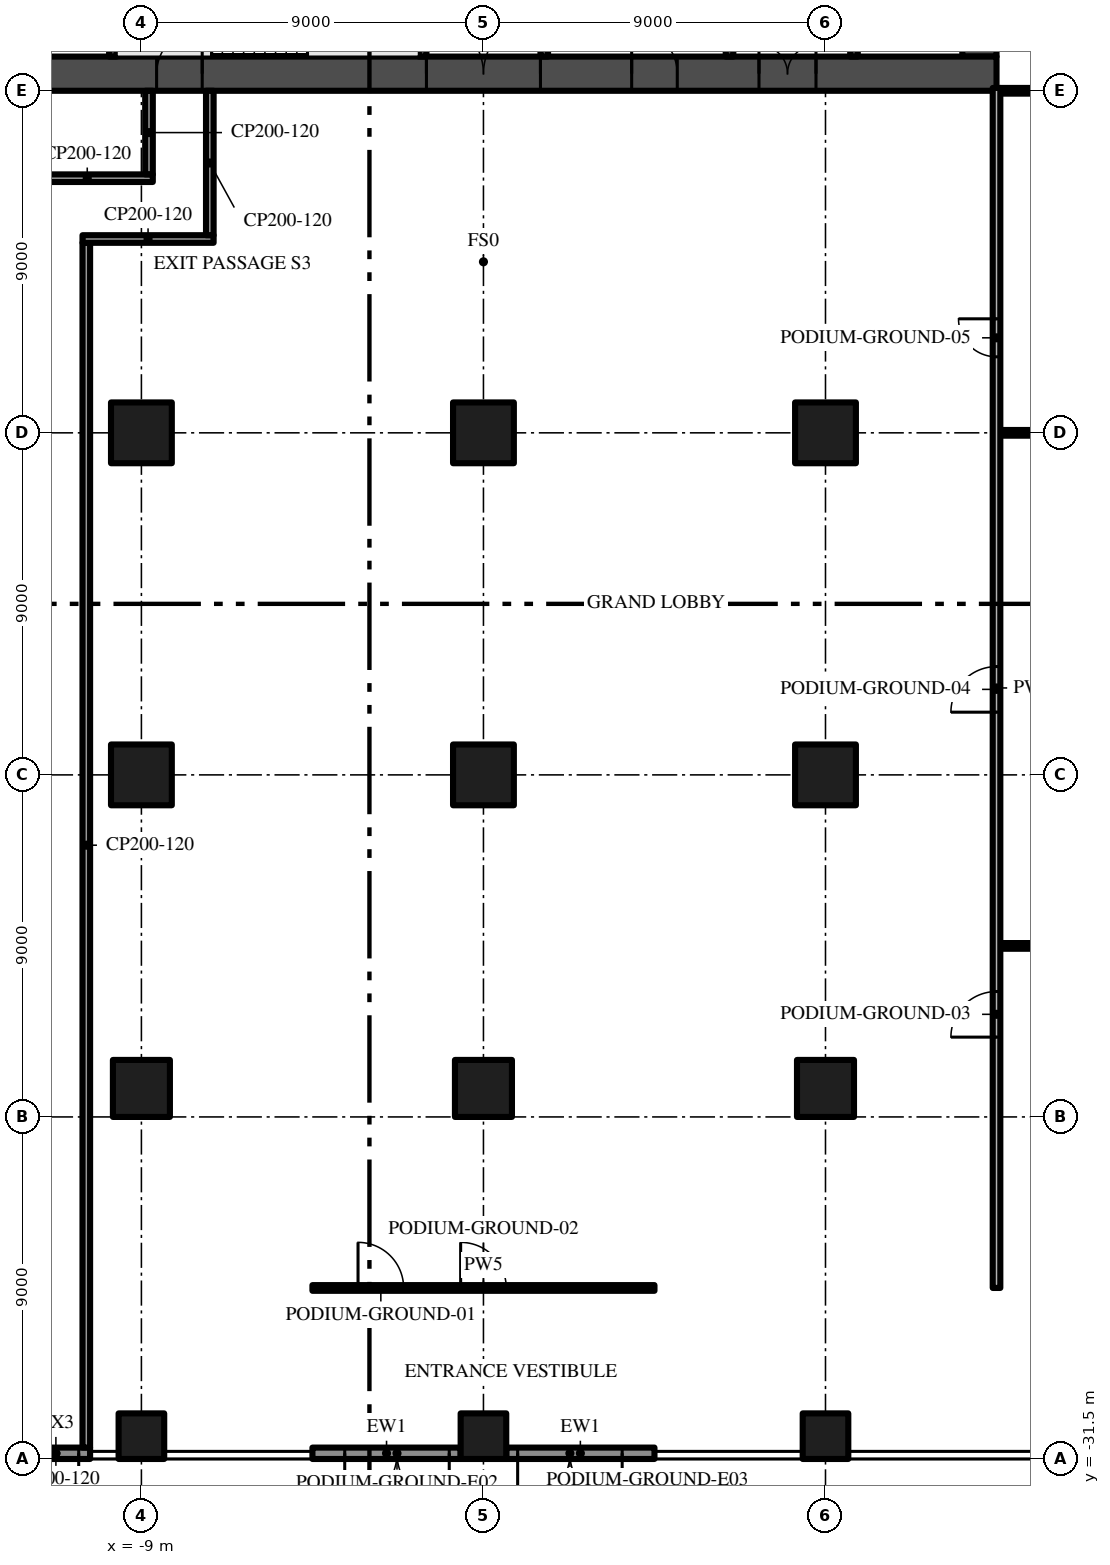
"""IFC4 building model, lengths in metres.
Left out: names, types, materials, properties, quantities, classifications, styles, units other than length and angle.
Written with IfcOpenShell. Run it as: python <this file> out.ifc"""

import sys

from ifc_helpers import new_model, si_unit, direction, frame, frame_2d, origin, origin_2d, place, context, subcontext, project, spatial, rectangle, extrude, element, fill, save


model = new_model("IFC4")
c1 = context("Model", 3, precision=1e-05, world=origin(), true_north=direction((0.0, 1.0)))
c2 = subcontext(c1, "Body", "Model", "MODEL_VIEW")
j1 = project(units=[si_unit("LENGTHUNIT", "METRE"), si_unit("PLANEANGLEUNIT", "RADIAN")], contexts=[c1])
p1 = place(None, origin())
s1 = spatial("IfcSite", under=j1, at=p1, CompositionType="ELEMENT")
p2 = place(p1, origin())
s2 = spatial("IfcBuilding", under=s1, at=p2, CompositionType="ELEMENT")
p3 = place(p2, origin())
s3 = spatial("IfcBuildingStorey", under=s2, at=p3, CompositionType="ELEMENT", Elevation=0.0)
p4 = place(p3, frame((-13.5, 4.95, -2.2), z_axis=(0.0, 0.0, 1.0), x_axis=(1.0, 0.0, 0.0)))
e1 = element("IfcWall", 1, at=p4, inside=s3, PredefinedType="SHEAR", context=c2, shape_type="SweptSolid", body=[
    extrude(rectangle(XDim=27.0, YDim=0.9, at=frame_2d((13.5, 0.0))), origin(), (0.0, 0.0, 1.0), 7.8),
])
p5 = place(p4, frame((12.0, 0.0, 2.2)))
e2 = element("IfcOpeningElement", 2, at=p5, cuts=e1, PredefinedType="OPENING", context=c2, shape_type="SweptSolid", body=[
    extrude(rectangle(XDim=3.0, YDim=2.4, at=frame_2d((1.5, 1.2))), frame((0.0, 0.46, 0.0), z_axis=(0.0, -1.0, 0.0), x_axis=(1.0, 0.0, 0.0)), (0.0, 0.0, 1.0), 0.92),
])
p6 = place(p4, frame((4.9, 0.0, 2.2)))
e3 = element("IfcOpeningElement", 3, at=p6, cuts=e1, PredefinedType="OPENING", context=c2, shape_type="SweptSolid", body=[
    extrude(rectangle(XDim=1.2, YDim=2.2, at=frame_2d((0.6, 1.1))), frame((0.0, 0.46, 0.0), z_axis=(0.0, -1.0, 0.0), x_axis=(1.0, 0.0, 0.0)), (0.0, 0.0, 1.0), 0.92),
])
p7 = place(p4, frame((20.75, 0.0, 2.2)))
e4 = element("IfcOpeningElement", 4, at=p7, cuts=e1, PredefinedType="OPENING", context=c2, shape_type="SweptSolid", body=[
    extrude(rectangle(XDim=1.5, YDim=2.2, at=frame_2d((0.75, 1.1))), frame((0.0, 0.46, 0.0), z_axis=(0.0, -1.0, 0.0), x_axis=(1.0, 0.0, 0.0)), (0.0, 0.0, 1.0), 0.92),
])
p8 = place(p4, frame((17.4, 0.0, 2.2)))
e5 = element("IfcOpeningElement", 5, at=p8, cuts=e1, PredefinedType="OPENING", context=c2, shape_type="SweptSolid", body=[
    extrude(rectangle(XDim=1.2, YDim=2.2, at=frame_2d((0.6, 1.1))), frame((0.0, 0.46, 0.0), z_axis=(0.0, -1.0, 0.0), x_axis=(1.0, 0.0, 0.0)), (0.0, 0.0, 1.0), 0.92),
])
p9 = place(p3, frame((13.05, 5.4, -2.2), z_axis=(0.0, 0.0, 1.0), x_axis=(0.0, 1.0, 0.0)))
e6 = element("IfcWall", 6, at=p9, inside=s3, PredefinedType="SHEAR", context=c2, shape_type="SweptSolid", body=[
    extrude(rectangle(XDim=16.2, YDim=0.9, at=frame_2d((8.1, 0.0))), origin(), (0.0, 0.0, 1.0), 7.8),
])
p10 = place(p9, frame((6.0, 0.0, 2.2)))
e7 = element("IfcOpeningElement", 7, at=p10, cuts=e6, PredefinedType="OPENING", context=c2, shape_type="SweptSolid", body=[
    extrude(rectangle(XDim=1.2, YDim=2.2, at=frame_2d((0.6, 1.1))), frame((0.0, 0.46, 0.0), z_axis=(0.0, -1.0, 0.0), x_axis=(1.0, 0.0, 0.0)), (0.0, 0.0, 1.0), 0.92),
])
for number, where, z_axis, x_axis in (
    (8, (-9.0, -30.9, 0.0), (0.0, 0.0, 1.0), (1.0, 0.0, 0.0)),
    (9, (0.0, -30.9, 0.0), (0.0, 0.0, 1.0), (1.0, 0.0, 0.0)),
    (10, (9.0, -30.9, 0.0), (0.0, 0.0, 1.0), (1.0, 0.0, 0.0)),
):
    element("IfcColumn", number, at=place(p3, frame(where, z_axis=z_axis, x_axis=x_axis)), inside=s3, PredefinedType="COLUMN", context=c2, shape_type="SweptSolid", body=[
        extrude(rectangle(XDim=1.2, YDim=1.2, at=origin_2d()), origin(), (0.0, 0.0, 1.0), 5.6),
    ])
p11 = place(p3, frame((-9.0, -13.5, 0.0), z_axis=(0.0, 0.0, 1.0), x_axis=(1.0, 0.0, 0.0)))
e11 = element("IfcColumn", 11, at=p11, inside=s3, PredefinedType="COLUMN", context=c2, shape_type="SweptSolid", body=[
    extrude(rectangle(XDim=1.6, YDim=1.6, at=origin_2d()), origin(), (0.0, 0.0, 1.0), 5.6),
])
p12 = place(p3, frame((-9.0, -21.75, 0.0), z_axis=(0.0, 0.0, 1.0), x_axis=(1.0, 0.0, 0.0)))
e12 = element("IfcColumn", 12, at=p12, inside=s3, PredefinedType="COLUMN", context=c2, shape_type="SweptSolid", body=[
    extrude(rectangle(XDim=1.5, YDim=1.5, at=origin_2d()), origin(), (0.0, 0.0, 1.0), 5.6),
])
for number, where, z_axis, x_axis in (
    (13, (-9.0, -4.5, 0.0), (0.0, 0.0, 1.0), (1.0, 0.0, 0.0)),
    (14, (0.0, -13.5, 0.0), (0.0, 0.0, 1.0), (1.0, 0.0, 0.0)),
):
    element("IfcColumn", number, at=place(p3, frame(where, z_axis=z_axis, x_axis=x_axis)), inside=s3, PredefinedType="COLUMN", context=c2, shape_type="SweptSolid", body=[
        extrude(rectangle(XDim=1.6, YDim=1.6, at=origin_2d()), origin(), (0.0, 0.0, 1.0), 5.6),
    ])
p13 = place(p3, frame((0.0, -21.75, 0.0), z_axis=(0.0, 0.0, 1.0), x_axis=(1.0, 0.0, 0.0)))
e15 = element("IfcColumn", 15, at=p13, inside=s3, PredefinedType="COLUMN", context=c2, shape_type="SweptSolid", body=[
    extrude(rectangle(XDim=1.5, YDim=1.5, at=origin_2d()), origin(), (0.0, 0.0, 1.0), 5.6),
])
for number, where, z_axis, x_axis in (
    (16, (0.0, -4.5, 0.0), (0.0, 0.0, 1.0), (1.0, 0.0, 0.0)),
    (17, (9.0, -13.5, 0.0), (0.0, 0.0, 1.0), (1.0, 0.0, 0.0)),
):
    element("IfcColumn", number, at=place(p3, frame(where, z_axis=z_axis, x_axis=x_axis)), inside=s3, PredefinedType="COLUMN", context=c2, shape_type="SweptSolid", body=[
        extrude(rectangle(XDim=1.6, YDim=1.6, at=origin_2d()), origin(), (0.0, 0.0, 1.0), 5.6),
    ])
p14 = place(p3, frame((9.0, -21.75, 0.0), z_axis=(0.0, 0.0, 1.0), x_axis=(1.0, 0.0, 0.0)))
e18 = element("IfcColumn", 18, at=p14, inside=s3, PredefinedType="COLUMN", context=c2, shape_type="SweptSolid", body=[
    extrude(rectangle(XDim=1.5, YDim=1.5, at=origin_2d()), origin(), (0.0, 0.0, 1.0), 5.6),
])
p15 = place(p3, frame((9.0, -4.5, 0.0), z_axis=(0.0, 0.0, 1.0), x_axis=(1.0, 0.0, 0.0)))
e19 = element("IfcColumn", 19, at=p15, inside=s3, PredefinedType="COLUMN", context=c2, shape_type="SweptSolid", body=[
    extrude(rectangle(XDim=1.6, YDim=1.6, at=origin_2d()), origin(), (0.0, 0.0, 1.0), 5.6),
])
p16 = place(p3, frame((-0.6, -31.35, 0.0), z_axis=(0.0, 0.0, 1.0), x_axis=(-1.0, 0.0, 0.0)))
e20 = element("IfcWall", 20, at=p16, inside=s3, PredefinedType="SOLIDWALL", context=c2, shape_type="SweptSolid", body=[
    extrude(rectangle(XDim=3.9, YDim=0.3, at=frame_2d((1.95, 0.0))), origin(), (0.0, 0.0, 1.0), 5.6),
])
p17 = place(p16, frame((0.3, 0.0, 0.0)))
e21 = element("IfcOpeningElement", 21, at=p17, cuts=e20, PredefinedType="OPENING", context=c2, shape_type="SweptSolid", body=[
    extrude(rectangle(XDim=2.75, YDim=2.7, at=frame_2d((1.375, 1.35))), frame((0.0, 0.16, 0.0), z_axis=(0.0, -1.0, 0.0), x_axis=(1.0, 0.0, 0.0)), (0.0, 0.0, 1.0), 0.32),
])
p18 = place(p3, frame((4.5, -31.35, 0.0), z_axis=(0.0, 0.0, 1.0), x_axis=(-1.0, 0.0, 0.0)))
e22 = element("IfcWall", 22, at=p18, inside=s3, PredefinedType="SOLIDWALL", context=c2, shape_type="SweptSolid", body=[
    extrude(rectangle(XDim=3.9, YDim=0.3, at=frame_2d((1.95, 0.0))), origin(), (0.0, 0.0, 1.0), 5.6),
])
p19 = place(p18, frame((0.85, 0.0, 0.0)))
e23 = element("IfcOpeningElement", 23, at=p19, cuts=e22, PredefinedType="OPENING", context=c2, shape_type="SweptSolid", body=[
    extrude(rectangle(XDim=2.75, YDim=2.7, at=frame_2d((1.375, 1.35))), frame((0.0, 0.16, 0.0), z_axis=(0.0, -1.0, 0.0), x_axis=(1.0, 0.0, 0.0)), (0.0, 0.0, 1.0), 0.32),
])
for number, where, z_axis, x_axis in (
    (24, (-9.75, 5.4, -0.4), (0.0, 0.0, 1.0), (0.0, 1.0, 0.0)),
    (25, (-1.6, 5.4, -0.4), (0.0, 0.0, 1.0), (0.0, 1.0, 0.0)),
):
    element("IfcWall", number, at=place(p3, frame(where, z_axis=z_axis, x_axis=x_axis)), inside=s3, PredefinedType="SHEAR", context=c2, shape_type="SweptSolid", body=[
        extrude(rectangle(XDim=2.55, YDim=0.2, at=frame_2d((1.275, 0.0))), origin(), (0.0, 0.0, 1.0), 6.0),
    ])
p20 = place(p3, frame((1.6, 9.2, -0.4), z_axis=(0.0, 0.0, 1.0), x_axis=(0.0, -1.0, 0.0)))
e26 = element("IfcWall", 26, at=p20, inside=s3, PredefinedType="SHEAR", context=c2, shape_type="SweptSolid", body=[
    extrude(rectangle(XDim=3.8, YDim=0.2, at=frame_2d((1.9, 0.0))), origin(), (0.0, 0.0, 1.0), 6.0),
])
p21 = place(p20, frame((1.05, 0.0, 0.4)))
e27 = element("IfcOpeningElement", 27, at=p21, cuts=e26, PredefinedType="OPENING", context=c2, shape_type="SweptSolid", body=[
    extrude(rectangle(XDim=0.9, YDim=2.1, at=frame_2d((0.45, 1.05))), frame((0.0, 0.11, 0.0), z_axis=(0.0, -1.0, 0.0), x_axis=(1.0, 0.0, 0.0)), (0.0, 0.0, 1.0), 0.22),
])
p22 = place(p3, frame((6.475, 5.4, -0.4), z_axis=(0.0, 0.0, 1.0), x_axis=(0.0, 1.0, 0.0)))
e28 = element("IfcWall", 28, at=p22, inside=s3, PredefinedType="SHEAR", context=c2, shape_type="SweptSolid", body=[
    extrude(rectangle(XDim=3.8, YDim=0.2, at=frame_2d((1.9, 0.0))), origin(), (0.0, 0.0, 1.0), 6.0),
])
p23 = place(p3, frame((9.75, 5.4, -0.4), z_axis=(0.0, 0.0, 1.0), x_axis=(0.0, 1.0, 0.0)))
e29 = element("IfcWall", 29, at=p23, inside=s3, PredefinedType="SHEAR", context=c2, shape_type="SweptSolid", body=[
    extrude(rectangle(XDim=2.2, YDim=0.2, at=frame_2d((1.1, 0.0))), origin(), (0.0, 0.0, 1.0), 6.0),
])
p24 = place(p23, frame((0.55, 0.0, 0.4)))
e30 = element("IfcOpeningElement", 30, at=p24, cuts=e29, PredefinedType="OPENING", context=c2, shape_type="SweptSolid", body=[
    extrude(rectangle(XDim=1.1, YDim=2.1, at=frame_2d((0.55, 1.05))), frame((0.0, 0.11, 0.0), z_axis=(0.0, -1.0, 0.0), x_axis=(1.0, 0.0, 0.0)), (0.0, 0.0, 1.0), 0.22),
])
p25 = place(p3, frame((-12.15, 2.2, 0.0), z_axis=(0.0, 0.0, 1.0), x_axis=(1.0, 0.0, 0.0)))
e31 = element("IfcWall", 31, at=p25, inside=s3, PredefinedType="PARTITIONING", context=c2, shape_type="SweptSolid", body=[
    extrude(rectangle(XDim=3.45, YDim=0.2, at=frame_2d((1.725, 0.0))), origin(), (0.0, 0.0, 1.0), 5.6),
])
p26 = place(p3, frame((-10.45, -31.2, 0.0), z_axis=(0.0, 0.0, 1.0), x_axis=(0.0, 1.0, 0.0)))
e32 = element("IfcWall", 32, at=p26, inside=s3, PredefinedType="PARTITIONING", context=c2, shape_type="SweptSolid", body=[
    extrude(rectangle(XDim=31.7, YDim=0.2, at=frame_2d((15.85, 0.0))), origin(), (0.0, 0.0, 1.0), 5.6),
])
p27 = place(p3, frame((-10.55, 0.6, 0.0), z_axis=(0.0, 0.0, 1.0), x_axis=(1.0, 0.0, 0.0)))
e33 = element("IfcWall", 33, at=p27, inside=s3, PredefinedType="PARTITIONING", context=c2, shape_type="SweptSolid", body=[
    extrude(rectangle(XDim=3.45, YDim=0.2, at=frame_2d((1.725, 0.0))), origin(), (0.0, 0.0, 1.0), 5.6),
])
p28 = place(p3, frame((-8.8, 2.3, 0.0), z_axis=(0.0, 0.0, 1.0), x_axis=(0.0, 1.0, 0.0)))
e34 = element("IfcWall", 34, at=p28, inside=s3, PredefinedType="PARTITIONING", context=c2, shape_type="SweptSolid", body=[
    extrude(rectangle(XDim=2.2, YDim=0.2, at=frame_2d((1.1, 0.0))), origin(), (0.0, 0.0, 1.0), 5.6),
])
p29 = place(p3, frame((-7.2, 0.7, 0.0), z_axis=(0.0, 0.0, 1.0), x_axis=(0.0, 1.0, 0.0)))
e35 = element("IfcWall", 35, at=p29, inside=s3, PredefinedType="PARTITIONING", context=c2, shape_type="SweptSolid", body=[
    extrude(rectangle(XDim=3.8, YDim=0.2, at=frame_2d((1.9, 0.0))), origin(), (0.0, 0.0, 1.0), 5.6),
])
p30 = place(p3, frame((-10.35, -31.35, 0.0), z_axis=(0.0, 0.0, 1.0), x_axis=(-1.0, 0.0, 0.0)))
e36 = element("IfcWall", 36, at=p30, inside=s3, PredefinedType="PARTITIONING", context=c2, shape_type="SweptSolid", body=[
    extrude(rectangle(XDim=1.8, YDim=0.3, at=frame_2d((0.9, 0.0))), origin(), (0.0, 0.0, 1.0), 5.6),
])
p31 = place(p30, frame((0.3, 0.0, 0.0)))
e37 = element("IfcOpeningElement", 37, at=p31, cuts=e36, PredefinedType="OPENING", context=c2, shape_type="SweptSolid", body=[
    extrude(rectangle(XDim=1.2, YDim=2.2, at=frame_2d((0.6, 1.1))), frame((0.0, 0.16, 0.0), z_axis=(0.0, -1.0, 0.0), x_axis=(1.0, 0.0, 0.0)), (0.0, 0.0, 1.0), 0.32),
])
p32 = place(p3, frame((-4.5, -27.0, 0.0), z_axis=(0.0, 0.0, 1.0), x_axis=(1.0, 0.0, 0.0)))
e38 = element("IfcWall", 38, at=p32, inside=s3, PredefinedType="PARTITIONING", context=c2, shape_type="SweptSolid", body=[
    extrude(rectangle(XDim=9.0, YDim=0.15, at=frame_2d((4.5, 0.0))), origin(), (0.0, 0.0, 1.0), 5.6),
])
p33 = place(p32, frame((1.2, 0.0, 0.0)))
e39 = element("IfcOpeningElement", 39, at=p33, cuts=e38, PredefinedType="OPENING", context=c2, shape_type="SweptSolid", body=[
    extrude(rectangle(XDim=1.2, YDim=2.4, at=frame_2d((0.6, 1.2))), frame((0.0, 0.085, 0.0), z_axis=(0.0, -1.0, 0.0), x_axis=(1.0, 0.0, 0.0)), (0.0, 0.0, 1.0), 0.17),
])
p34 = place(p32, frame((3.9, 0.0, 0.0)))
e40 = element("IfcOpeningElement", 40, at=p34, cuts=e38, PredefinedType="OPENING", context=c2, shape_type="SweptSolid", body=[
    extrude(rectangle(XDim=1.2, YDim=2.4, at=frame_2d((0.6, 1.2))), frame((0.0, 0.085, 0.0), z_axis=(0.0, -1.0, 0.0), x_axis=(1.0, 0.0, 0.0)), (0.0, 0.0, 1.0), 0.17),
])
p35 = place(p3, frame((13.6, -18.0, 0.0), z_axis=(0.0, 0.0, 1.0), x_axis=(1.0, 0.0, 0.0)))
e41 = element("IfcWall", 41, at=p35, inside=s3, PredefinedType="PARTITIONING", context=c2, shape_type="SweptSolid", body=[
    extrude(rectangle(XDim=8.15, YDim=0.15, at=frame_2d((4.075, 0.0))), origin(), (0.0, 0.0, 1.0), 5.6),
])
for number, where, z_axis, x_axis in (
    (42, (13.6, -4.5, 0.0), (0.0, 0.0, 1.0), (1.0, 0.0, 0.0)),
    (43, (13.6, 4.5, 0.0), (0.0, 0.0, 1.0), (1.0, 0.0, 0.0)),
):
    element("IfcWall", number, at=place(p3, frame(where, z_axis=z_axis, x_axis=x_axis)), inside=s3, PredefinedType="PARTITIONING", context=c2, shape_type="SweptSolid", body=[
        extrude(rectangle(XDim=3.6, YDim=0.15, at=frame_2d((1.8, 0.0))), origin(), (0.0, 0.0, 1.0), 5.6),
    ])
p36 = place(p3, frame((13.5, -27.0, 0.0), z_axis=(0.0, 0.0, 1.0), x_axis=(0.0, 1.0, 0.0)))
e44 = element("IfcWall", 44, at=p36, inside=s3, PredefinedType="PARTITIONING", context=c2, shape_type="SweptSolid", body=[
    extrude(rectangle(XDim=31.575, YDim=0.2, at=frame_2d((15.787, 0.0))), origin(), (0.0, 0.0, 1.0), 5.6),
])
p37 = place(p36, frame((6.6, 0.0, 0.0)))
e45 = element("IfcOpeningElement", 45, at=p37, cuts=e44, PredefinedType="OPENING", context=c2, shape_type="SweptSolid", body=[
    extrude(rectangle(XDim=1.2, YDim=2.4, at=frame_2d((0.6, 1.2))), frame((0.0, 0.11, 0.0), z_axis=(0.0, -1.0, 0.0), x_axis=(1.0, 0.0, 0.0)), (0.0, 0.0, 1.0), 0.22),
])
p38 = place(p36, frame((15.15, 0.0, 0.0)))
e46 = element("IfcOpeningElement", 46, at=p38, cuts=e44, PredefinedType="OPENING", context=c2, shape_type="SweptSolid", body=[
    extrude(rectangle(XDim=1.2, YDim=2.4, at=frame_2d((0.6, 1.2))), frame((0.0, 0.11, 0.0), z_axis=(0.0, -1.0, 0.0), x_axis=(1.0, 0.0, 0.0)), (0.0, 0.0, 1.0), 0.22),
])
p39 = place(p36, frame((24.5, 0.0, 0.0)))
e47 = element("IfcOpeningElement", 47, at=p39, cuts=e44, PredefinedType="OPENING", context=c2, shape_type="SweptSolid", body=[
    extrude(rectangle(XDim=1.0, YDim=2.4, at=frame_2d((0.5, 1.2))), frame((0.0, 0.11, 0.0), z_axis=(0.0, -1.0, 0.0), x_axis=(1.0, 0.0, 0.0)), (0.0, 0.0, 1.0), 0.22),
])
p40 = place(p17, origin())
e48 = element("IfcDoor", 48, at=p40, inside=s3, OperationType="SINGLE_SWING_LEFT", PredefinedType="DOOR", context=c2, shape_type="SweptSolid", body=[
    extrude(rectangle(XDim=2.75, YDim=2.7, at=frame_2d((1.375, 1.35))), frame((0.0, 0.025, 0.0), z_axis=(0.0, -1.0, 0.0), x_axis=(1.0, 0.0, 0.0)), (0.0, 0.0, 1.0), 0.05),
])
fill(e21, e48)
p41 = place(p19, origin())
e49 = element("IfcDoor", 49, at=p41, inside=s3, OperationType="SINGLE_SWING_LEFT", PredefinedType="DOOR", context=c2, shape_type="SweptSolid", body=[
    extrude(rectangle(XDim=2.75, YDim=2.7, at=frame_2d((1.375, 1.35))), frame((0.0, 0.025, 0.0), z_axis=(0.0, -1.0, 0.0), x_axis=(1.0, 0.0, 0.0)), (0.0, 0.0, 1.0), 0.05),
])
fill(e23, e49)
p42 = place(p5, frame((3.0, 0.0, 0.0), z_axis=(0.0, 0.0, 1.0), x_axis=(-1.0, 0.0, 0.0)))
e50 = element("IfcDoor", 50, at=p42, inside=s3, OperationType="DOUBLE_DOOR_SINGLE_SWING", PredefinedType="DOOR", context=c2, shape_type="SweptSolid", body=[
    extrude(rectangle(XDim=3.0, YDim=2.4, at=frame_2d((1.5, 1.2))), frame((0.0, 0.025, 0.0), z_axis=(0.0, -1.0, 0.0), x_axis=(1.0, 0.0, 0.0)), (0.0, 0.0, 1.0), 0.05),
])
fill(e2, e50)
p43 = place(p6, frame((1.2, 0.0, 0.0), z_axis=(0.0, 0.0, 1.0), x_axis=(-1.0, 0.0, 0.0)))
e51 = element("IfcDoor", 51, at=p43, inside=s3, OperationType="SINGLE_SWING_LEFT", PredefinedType="DOOR", context=c2, shape_type="SweptSolid", body=[
    extrude(rectangle(XDim=1.2, YDim=2.2, at=frame_2d((0.6, 1.1))), frame((0.0, 0.025, 0.0), z_axis=(0.0, -1.0, 0.0), x_axis=(1.0, 0.0, 0.0)), (0.0, 0.0, 1.0), 0.05),
])
fill(e3, e51)
p44 = place(p7, frame((1.5, 0.0, 0.0), z_axis=(0.0, 0.0, 1.0), x_axis=(-1.0, 0.0, 0.0)))
e52 = element("IfcDoor", 52, at=p44, inside=s3, OperationType="DOUBLE_DOOR_SINGLE_SWING", PredefinedType="DOOR", context=c2, shape_type="SweptSolid", body=[
    extrude(rectangle(XDim=1.5, YDim=2.2, at=frame_2d((0.75, 1.1))), frame((0.0, 0.025, 0.0), z_axis=(0.0, -1.0, 0.0), x_axis=(1.0, 0.0, 0.0)), (0.0, 0.0, 1.0), 0.05),
])
fill(e4, e52)
p45 = place(p8, frame((1.2, 0.0, 0.0), z_axis=(0.0, 0.0, 1.0), x_axis=(-1.0, 0.0, 0.0)))
e53 = element("IfcDoor", 53, at=p45, inside=s3, OperationType="SINGLE_SWING_RIGHT", PredefinedType="DOOR", context=c2, shape_type="SweptSolid", body=[
    extrude(rectangle(XDim=1.2, YDim=2.2, at=frame_2d((0.6, 1.1))), frame((0.0, 0.025, 0.0), z_axis=(0.0, -1.0, 0.0), x_axis=(1.0, 0.0, 0.0)), (0.0, 0.0, 1.0), 0.05),
])
fill(e5, e53)
p46 = place(p31, origin())
e54 = element("IfcDoor", 54, at=p46, inside=s3, OperationType="SINGLE_SWING_LEFT", PredefinedType="DOOR", context=c2, shape_type="SweptSolid", body=[
    extrude(rectangle(XDim=1.2, YDim=2.2, at=frame_2d((0.6, 1.1))), frame((0.0, 0.025, 0.0), z_axis=(0.0, -1.0, 0.0), x_axis=(1.0, 0.0, 0.0)), (0.0, 0.0, 1.0), 0.05),
])
fill(e37, e54)
p47 = place(p33, origin())
e55 = element("IfcDoor", 55, at=p47, inside=s3, OperationType="SINGLE_SWING_LEFT", PredefinedType="DOOR", context=c2, shape_type="SweptSolid", body=[
    extrude(rectangle(XDim=1.2, YDim=2.4, at=frame_2d((0.6, 1.2))), frame((0.0, 0.025, 0.0), z_axis=(0.0, -1.0, 0.0), x_axis=(1.0, 0.0, 0.0)), (0.0, 0.0, 1.0), 0.05),
])
fill(e39, e55)
p48 = place(p34, origin())
e56 = element("IfcDoor", 56, at=p48, inside=s3, OperationType="SINGLE_SWING_LEFT", PredefinedType="DOOR", context=c2, shape_type="SweptSolid", body=[
    extrude(rectangle(XDim=1.2, YDim=2.4, at=frame_2d((0.6, 1.2))), frame((0.0, 0.025, 0.0), z_axis=(0.0, -1.0, 0.0), x_axis=(1.0, 0.0, 0.0)), (0.0, 0.0, 1.0), 0.05),
])
fill(e40, e56)
p49 = place(p37, origin())
e57 = element("IfcDoor", 57, at=p49, inside=s3, OperationType="SINGLE_SWING_LEFT", PredefinedType="DOOR", context=c2, shape_type="SweptSolid", body=[
    extrude(rectangle(XDim=1.2, YDim=2.4, at=frame_2d((0.6, 1.2))), frame((0.0, 0.025, 0.0), z_axis=(0.0, -1.0, 0.0), x_axis=(1.0, 0.0, 0.0)), (0.0, 0.0, 1.0), 0.05),
])
fill(e45, e57)
p50 = place(p38, origin())
e58 = element("IfcDoor", 58, at=p50, inside=s3, OperationType="SINGLE_SWING_LEFT", PredefinedType="DOOR", context=c2, shape_type="SweptSolid", body=[
    extrude(rectangle(XDim=1.2, YDim=2.4, at=frame_2d((0.6, 1.2))), frame((0.0, 0.025, 0.0), z_axis=(0.0, -1.0, 0.0), x_axis=(1.0, 0.0, 0.0)), (0.0, 0.0, 1.0), 0.05),
])
fill(e46, e58)
p51 = place(p39, origin())
e59 = element("IfcDoor", 59, at=p51, inside=s3, OperationType="SINGLE_SWING_RIGHT", PredefinedType="DOOR", context=c2, shape_type="SweptSolid", body=[
    extrude(rectangle(XDim=1.0, YDim=2.4, at=frame_2d((0.5, 1.2))), frame((0.0, 0.025, 0.0), z_axis=(0.0, -1.0, 0.0), x_axis=(1.0, 0.0, 0.0)), (0.0, 0.0, 1.0), 0.05),
])
fill(e47, e59)
save(model, sys.argv[1])
